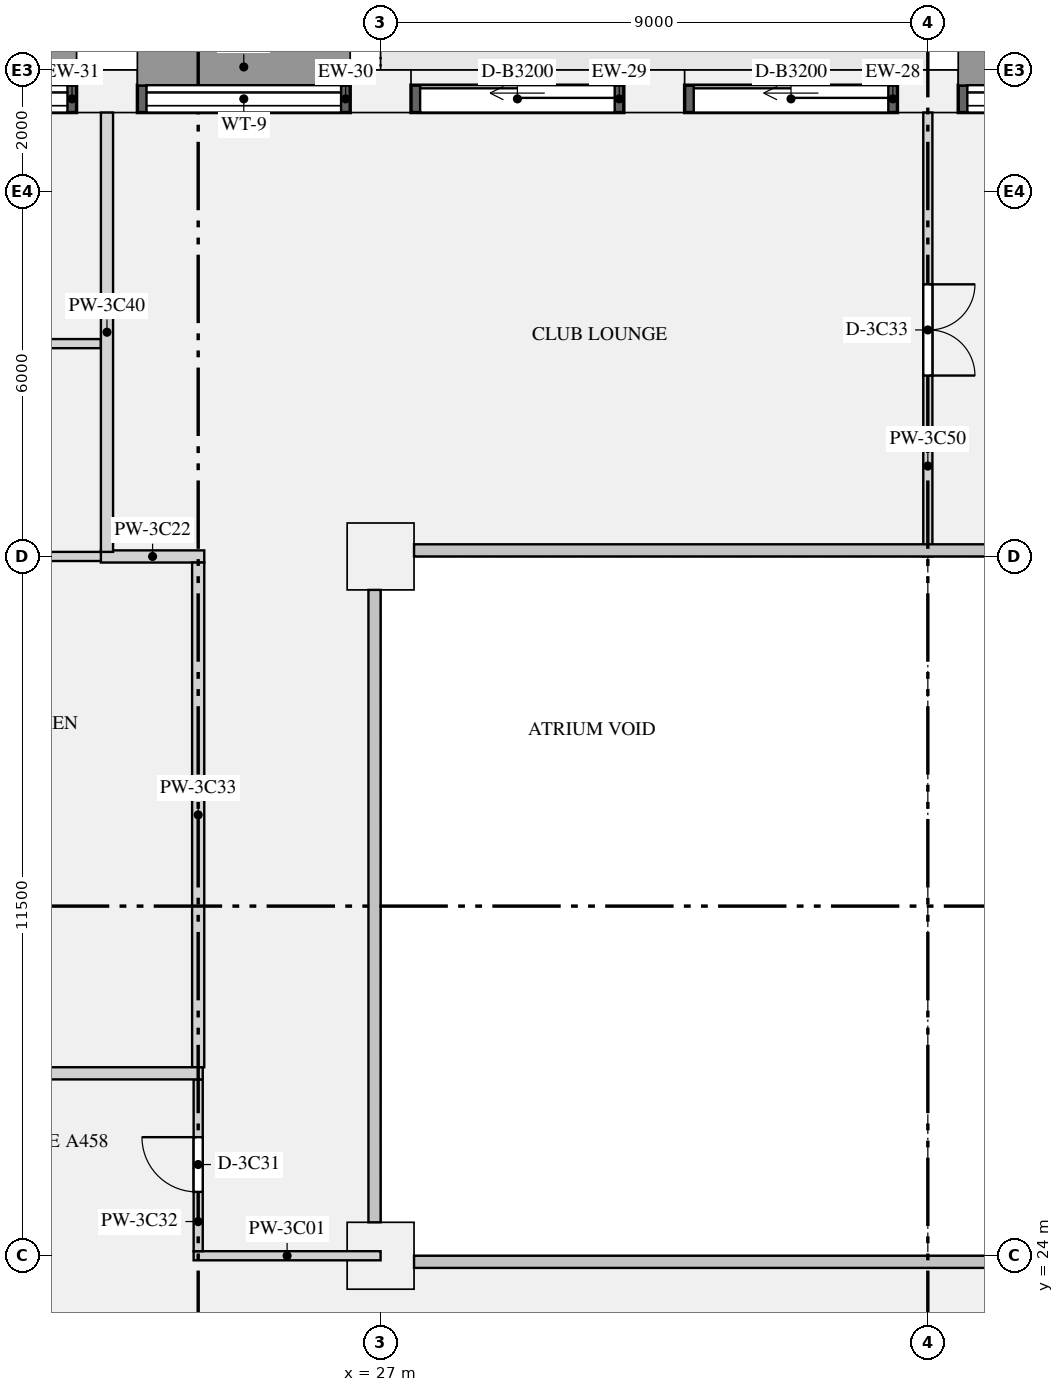
"""IFC4 building model, lengths in metres.
Left out: names, types, materials, properties, quantities, classifications, styles, units other than length and angle.
Written with IfcOpenShell. Run it as: python <this file> out.ifc"""

import sys

from ifc_helpers import new_model, si_unit, direction, frame, frame_2d, origin, origin_2d, place, context, subcontext, project, spatial, rectangle, extrude, element, fill, save


model = new_model("IFC4")
c1 = context("Model", 3, precision=1e-05, world=origin(), true_north=direction((0.0, 1.0)))
c2 = subcontext(c1, "Body", "Model", "MODEL_VIEW")
j1 = project(units=[si_unit("LENGTHUNIT", "METRE"), si_unit("PLANEANGLEUNIT", "RADIAN")], contexts=[c1])
p1 = place(None, origin())
s1 = spatial("IfcSite", under=j1, at=p1, CompositionType="ELEMENT")
p2 = place(p1, origin())
s2 = spatial("IfcBuilding", under=s1, at=p2, CompositionType="ELEMENT")
p3 = place(p2, frame((0.0, 0.0, 160.2)))
s3 = spatial("IfcBuildingStorey", under=s2, at=p3, CompositionType="ELEMENT", Elevation=160.2)
for number, where, z_axis, x_axis in (
    (1, (36.0, 43.15, 0.0), (0.0, 0.0, 1.0), (-1.0, 0.0, 0.0)),
    (2, (31.5, 43.15, 0.0), (0.0, 0.0, 1.0), (-1.0, 0.0, 0.0)),
    (3, (27.0, 43.15, 0.0), (0.0, 0.0, 1.0), (-1.0, 0.0, 0.0)),
    (4, (22.5, 43.15, 0.0), (0.0, 0.0, 1.0), (-1.0, 0.0, 0.0)),
):
    element("IfcColumn", number, at=place(p3, frame(where, z_axis=z_axis, x_axis=x_axis)), inside=s3, PredefinedType="USERDEFINED", context=c2, shape_type="SweptSolid", body=[
        extrude(rectangle(XDim=1.0, YDim=0.7, at=origin_2d()), origin(), (0.0, 0.0, 1.0), 3.15),
    ])
for number, where, z_axis, x_axis in (
    (5, (27.0, 24.0, 0.0), (0.0, 0.0, 1.0), (1.0, 0.0, 0.0)),
    (6, (27.0, 35.5, 0.0), (0.0, 0.0, 1.0), (1.0, 0.0, 0.0)),
):
    element("IfcColumn", number, at=place(p3, frame(where, z_axis=z_axis, x_axis=x_axis)), inside=s3, PredefinedType="COLUMN", context=c2, shape_type="SweptSolid", body=[
        extrude(rectangle(XDim=1.1, YDim=1.1, at=origin_2d()), origin(), (0.0, 0.0, 1.0), 3.15),
    ])
p4 = place(p3, frame((40.0, 43.025, 0.9), z_axis=(0.0, 0.0, 1.0), x_axis=(-1.0, 0.0, 0.0)))
e7 = element("IfcWall", 7, at=p4, inside=s3, PredefinedType="SOLIDWALL", context=c2, shape_type="SweptSolid", body=[
    extrude(rectangle(XDim=3.5, YDim=0.45, at=frame_2d((1.75, 0.0))), origin(), (0.0, 0.0, 1.0), 1.93),
])
p5 = place(p4, frame((0.15, 0.0, 0.15)))
e8 = element("IfcOpeningElement", 8, at=p5, cuts=e7, PredefinedType="OPENING", context=c2, shape_type="SweptSolid", body=[
    extrude(rectangle(XDim=3.2, YDim=1.5, at=frame_2d((1.6, 0.75))), frame((0.0, 0.235, 0.0), z_axis=(0.0, -1.0, 0.0), x_axis=(1.0, 0.0, 0.0)), (0.0, 0.0, 1.0), 0.47),
])
p6 = place(p3, frame((35.5, 43.025, 0.0), z_axis=(0.0, 0.0, 1.0), x_axis=(-1.0, 0.0, 0.0)))
e9 = element("IfcWall", 9, at=p6, inside=s3, PredefinedType="SOLIDWALL", context=c2, shape_type="SweptSolid", body=[
    extrude(rectangle(XDim=3.5, YDim=0.45, at=frame_2d((1.75, 0.0))), origin(), (0.0, 0.0, 1.0), 2.83),
])
p7 = place(p6, frame((0.15, 0.0, 0.0)))
e10 = element("IfcOpeningElement", 10, at=p7, cuts=e9, PredefinedType="OPENING", context=c2, shape_type="SweptSolid", body=[
    extrude(rectangle(XDim=3.2, YDim=2.3, at=frame_2d((1.6, 1.15))), frame((0.0, 0.235, 0.0), z_axis=(0.0, -1.0, 0.0), x_axis=(1.0, 0.0, 0.0)), (0.0, 0.0, 1.0), 0.47),
])
p8 = place(p3, frame((31.0, 43.025, 0.0), z_axis=(0.0, 0.0, 1.0), x_axis=(-1.0, 0.0, 0.0)))
e11 = element("IfcWall", 11, at=p8, inside=s3, PredefinedType="SOLIDWALL", context=c2, shape_type="SweptSolid", body=[
    extrude(rectangle(XDim=3.5, YDim=0.45, at=frame_2d((1.75, 0.0))), origin(), (0.0, 0.0, 1.0), 2.83),
])
p9 = place(p8, frame((0.15, 0.0, 0.0)))
e12 = element("IfcOpeningElement", 12, at=p9, cuts=e11, PredefinedType="OPENING", context=c2, shape_type="SweptSolid", body=[
    extrude(rectangle(XDim=3.2, YDim=2.3, at=frame_2d((1.6, 1.15))), frame((0.0, 0.235, 0.0), z_axis=(0.0, -1.0, 0.0), x_axis=(1.0, 0.0, 0.0)), (0.0, 0.0, 1.0), 0.47),
])
p10 = place(p3, frame((26.5, 43.025, 0.9), z_axis=(0.0, 0.0, 1.0), x_axis=(-1.0, 0.0, 0.0)))
e13 = element("IfcWall", 13, at=p10, inside=s3, PredefinedType="SOLIDWALL", context=c2, shape_type="SweptSolid", body=[
    extrude(rectangle(XDim=3.5, YDim=0.45, at=frame_2d((1.75, 0.0))), origin(), (0.0, 0.0, 1.0), 1.93),
])
p11 = place(p10, frame((0.15, 0.0, 0.15)))
e14 = element("IfcOpeningElement", 14, at=p11, cuts=e13, PredefinedType="OPENING", context=c2, shape_type="SweptSolid", body=[
    extrude(rectangle(XDim=3.2, YDim=1.5, at=frame_2d((1.6, 0.75))), frame((0.0, 0.235, 0.0), z_axis=(0.0, -1.0, 0.0), x_axis=(1.0, 0.0, 0.0)), (0.0, 0.0, 1.0), 0.47),
])
p12 = place(p3, frame((22.0, 43.025, 0.9), z_axis=(0.0, 0.0, 1.0), x_axis=(-1.0, 0.0, 0.0)))
e15 = element("IfcWall", 15, at=p12, inside=s3, PredefinedType="SOLIDWALL", context=c2, shape_type="SweptSolid", body=[
    extrude(rectangle(XDim=3.5, YDim=0.45, at=frame_2d((1.75, 0.0))), origin(), (0.0, 0.0, 1.0), 1.93),
])
p13 = place(p12, frame((0.15, 0.0, 0.15)))
e16 = element("IfcOpeningElement", 16, at=p13, cuts=e15, PredefinedType="OPENING", context=c2, shape_type="SweptSolid", body=[
    extrude(rectangle(XDim=3.2, YDim=1.5, at=frame_2d((1.6, 0.75))), frame((0.0, 0.235, 0.0), z_axis=(0.0, -1.0, 0.0), x_axis=(1.0, 0.0, 0.0)), (0.0, 0.0, 1.0), 0.47),
])
p14 = place(p3, frame((23.925, 24.0, 0.0), z_axis=(0.0, 0.0, 1.0), x_axis=(1.0, 0.0, 0.0)))
e17 = element("IfcWall", 17, at=p14, inside=s3, PredefinedType="PARTITIONING", context=c2, shape_type="SweptSolid", body=[
    extrude(rectangle(XDim=3.075, YDim=0.15, at=frame_2d((1.538, 0.0))), origin(), (0.0, 0.0, 1.0), 2.83),
])
p15 = place(p3, frame((17.1, 27.0, 0.0), z_axis=(0.0, 0.0, 1.0), x_axis=(1.0, 0.0, 0.0)))
e18 = element("IfcWall", 18, at=p15, inside=s3, PredefinedType="PARTITIONING", context=c2, shape_type="SweptSolid", body=[
    extrude(rectangle(XDim=6.975, YDim=0.2, at=frame_2d((3.487, 0.0))), origin(), (0.0, 0.0, 1.0), 2.83),
])
p16 = place(p3, frame((13.575, 39.0, 0.0), z_axis=(0.0, 0.0, 1.0), x_axis=(1.0, 0.0, 0.0)))
e19 = element("IfcWall", 19, at=p16, inside=s3, PredefinedType="PARTITIONING", context=c2, shape_type="SweptSolid", body=[
    extrude(rectangle(XDim=8.825, YDim=0.15, at=frame_2d((4.413, 0.0))), origin(), (0.0, 0.0, 1.0), 2.83),
])
p17 = place(p16, frame((1.725, 0.0, 0.0)))
e20 = element("IfcOpeningElement", 20, at=p17, cuts=e19, PredefinedType="OPENING", context=c2, shape_type="SweptSolid", body=[
    extrude(rectangle(XDim=0.9, YDim=2.1, at=frame_2d((0.45, 1.05))), frame((0.0, 0.085, 0.0), z_axis=(0.0, -1.0, 0.0), x_axis=(1.0, 0.0, 0.0)), (0.0, 0.0, 1.0), 0.17),
])
p18 = place(p16, frame((6.225, 0.0, 0.0)))
e21 = element("IfcOpeningElement", 21, at=p18, cuts=e19, PredefinedType="OPENING", context=c2, shape_type="SweptSolid", body=[
    extrude(rectangle(XDim=0.9, YDim=2.1, at=frame_2d((0.45, 1.05))), frame((0.0, 0.085, 0.0), z_axis=(0.0, -1.0, 0.0), x_axis=(1.0, 0.0, 0.0)), (0.0, 0.0, 1.0), 0.17),
])
p19 = place(p3, frame((18.075, 35.5, 0.0), z_axis=(0.0, 0.0, 1.0), x_axis=(1.0, 0.0, 0.0)))
e22 = element("IfcWall", 22, at=p19, inside=s3, PredefinedType="PARTITIONING", context=c2, shape_type="SweptSolid", body=[
    extrude(rectangle(XDim=4.525, YDim=0.15, at=frame_2d((2.263, 0.0))), origin(), (0.0, 0.0, 1.0), 2.83),
])
p20 = place(p3, frame((22.4, 35.5, 0.0), z_axis=(0.0, 0.0, 1.0), x_axis=(1.0, 0.0, 0.0)))
e23 = element("IfcWall", 23, at=p20, inside=s3, PredefinedType="PARTITIONING", context=c2, shape_type="SweptSolid", body=[
    extrude(rectangle(XDim=1.7, YDim=0.2, at=frame_2d((0.85, 0.0))), origin(), (0.0, 0.0, 1.0), 2.83),
])
p21 = place(p3, frame((24.0, 24.075, 0.0), z_axis=(0.0, 0.0, 1.0), x_axis=(0.0, 1.0, 0.0)))
e24 = element("IfcWall", 24, at=p21, inside=s3, PredefinedType="PARTITIONING", context=c2, shape_type="SweptSolid", body=[
    extrude(rectangle(XDim=2.825, YDim=0.15, at=frame_2d((1.413, 0.0))), origin(), (0.0, 0.0, 1.0), 2.83),
])
p22 = place(p21, frame((0.975, 0.0, 0.0)))
e25 = element("IfcOpeningElement", 25, at=p22, cuts=e24, PredefinedType="OPENING", context=c2, shape_type="SweptSolid", body=[
    extrude(rectangle(XDim=0.9, YDim=2.1, at=frame_2d((0.45, 1.05))), frame((0.0, 0.085, 0.0), z_axis=(0.0, -1.0, 0.0), x_axis=(1.0, 0.0, 0.0)), (0.0, 0.0, 1.0), 0.17),
])
p23 = place(p3, frame((24.0, 27.1, 0.0), z_axis=(0.0, 0.0, 1.0), x_axis=(0.0, 1.0, 0.0)))
e26 = element("IfcWall", 26, at=p23, inside=s3, PredefinedType="PARTITIONING", context=c2, shape_type="SweptSolid", body=[
    extrude(rectangle(XDim=8.3, YDim=0.2, at=frame_2d((4.15, 0.0))), origin(), (0.0, 0.0, 1.0), 2.83),
])
p24 = place(p3, frame((22.5, 35.575, 0.0), z_axis=(0.0, 0.0, 1.0), x_axis=(0.0, 1.0, 0.0)))
e27 = element("IfcWall", 27, at=p24, inside=s3, PredefinedType="PARTITIONING", context=c2, shape_type="SweptSolid", body=[
    extrude(rectangle(XDim=7.225, YDim=0.2, at=frame_2d((3.613, 0.0))), origin(), (0.0, 0.0, 1.0), 2.83),
])
p25 = place(p3, frame((36.0, 35.5, 0.0), z_axis=(0.0, 0.0, 1.0), x_axis=(0.0, 1.0, 0.0)))
e28 = element("IfcWall", 28, at=p25, inside=s3, PredefinedType="PARTITIONING", context=c2, shape_type="SweptSolid", body=[
    extrude(rectangle(XDim=7.3, YDim=0.15, at=frame_2d((3.65, 0.0))), origin(), (0.0, 0.0, 1.0), 2.83),
])
p26 = place(p25, frame((2.975, 0.0, 0.0)))
e29 = element("IfcOpeningElement", 29, at=p26, cuts=e28, PredefinedType="OPENING", context=c2, shape_type="SweptSolid", body=[
    extrude(rectangle(XDim=1.5, YDim=2.1, at=frame_2d((0.75, 1.05))), frame((0.0, 0.085, 0.0), z_axis=(0.0, -1.0, 0.0), x_axis=(1.0, 0.0, 0.0)), (0.0, 0.0, 1.0), 0.17),
])
p27 = place(p5, origin())
e30 = element("IfcWindow", 30, at=p27, inside=s3, PartitioningType="SINGLE_PANEL", PredefinedType="WINDOW", context=c2, shape_type="SweptSolid", body=[
    extrude(rectangle(XDim=3.2, YDim=1.5, at=frame_2d((1.6, 0.75))), frame((0.0, -0.065, 0.0), z_axis=(0.0, -1.0, 0.0), x_axis=(1.0, 0.0, 0.0)), (0.0, 0.0, 1.0), 0.06),
])
fill(e8, e30)
p28 = place(p7, origin())
e31 = element("IfcDoor", 31, at=p28, inside=s3, OperationType="SLIDING_TO_LEFT", PredefinedType="DOOR", context=c2, shape_type="SweptSolid", body=[
    extrude(rectangle(XDim=3.2, YDim=2.3, at=frame_2d((1.6, 1.15))), frame((0.0, -0.07, 0.0), z_axis=(0.0, -1.0, 0.0), x_axis=(1.0, 0.0, 0.0)), (0.0, 0.0, 1.0), 0.05),
])
fill(e10, e31)
p29 = place(p9, origin())
e32 = element("IfcDoor", 32, at=p29, inside=s3, OperationType="SLIDING_TO_LEFT", PredefinedType="DOOR", context=c2, shape_type="SweptSolid", body=[
    extrude(rectangle(XDim=3.2, YDim=2.3, at=frame_2d((1.6, 1.15))), frame((0.0, -0.07, 0.0), z_axis=(0.0, -1.0, 0.0), x_axis=(1.0, 0.0, 0.0)), (0.0, 0.0, 1.0), 0.05),
])
fill(e12, e32)
p30 = place(p11, origin())
e33 = element("IfcWindow", 33, at=p30, inside=s3, PartitioningType="SINGLE_PANEL", PredefinedType="WINDOW", context=c2, shape_type="SweptSolid", body=[
    extrude(rectangle(XDim=3.2, YDim=1.5, at=frame_2d((1.6, 0.75))), frame((0.0, -0.065, 0.0), z_axis=(0.0, -1.0, 0.0), x_axis=(1.0, 0.0, 0.0)), (0.0, 0.0, 1.0), 0.06),
])
fill(e14, e33)
p31 = place(p13, origin())
e34 = element("IfcWindow", 34, at=p31, inside=s3, PartitioningType="SINGLE_PANEL", PredefinedType="WINDOW", context=c2, shape_type="SweptSolid", body=[
    extrude(rectangle(XDim=3.2, YDim=1.5, at=frame_2d((1.6, 0.75))), frame((0.0, -0.065, 0.0), z_axis=(0.0, -1.0, 0.0), x_axis=(1.0, 0.0, 0.0)), (0.0, 0.0, 1.0), 0.06),
])
fill(e16, e34)
p32 = place(p22, origin())
e35 = element("IfcDoor", 35, at=p32, inside=s3, OperationType="SINGLE_SWING_RIGHT", PredefinedType="DOOR", context=c2, shape_type="SweptSolid", body=[
    extrude(rectangle(XDim=0.9, YDim=2.1, at=frame_2d((0.45, 1.05))), frame((0.0, 0.025, 0.0), z_axis=(0.0, -1.0, 0.0), x_axis=(1.0, 0.0, 0.0)), (0.0, 0.0, 1.0), 0.05),
])
fill(e25, e35)
p33 = place(p26, frame((1.5, 0.0, 0.0), z_axis=(0.0, 0.0, 1.0), x_axis=(-1.0, 0.0, 0.0)))
e36 = element("IfcDoor", 36, at=p33, inside=s3, OperationType="DOUBLE_DOOR_SINGLE_SWING", PredefinedType="DOOR", context=c2, shape_type="SweptSolid", body=[
    extrude(rectangle(XDim=1.5, YDim=2.1, at=frame_2d((0.75, 1.05))), frame((0.0, 0.025, 0.0), z_axis=(0.0, -1.0, 0.0), x_axis=(1.0, 0.0, 0.0)), (0.0, 0.0, 1.0), 0.05),
])
fill(e29, e36)
save(model, sys.argv[1])
